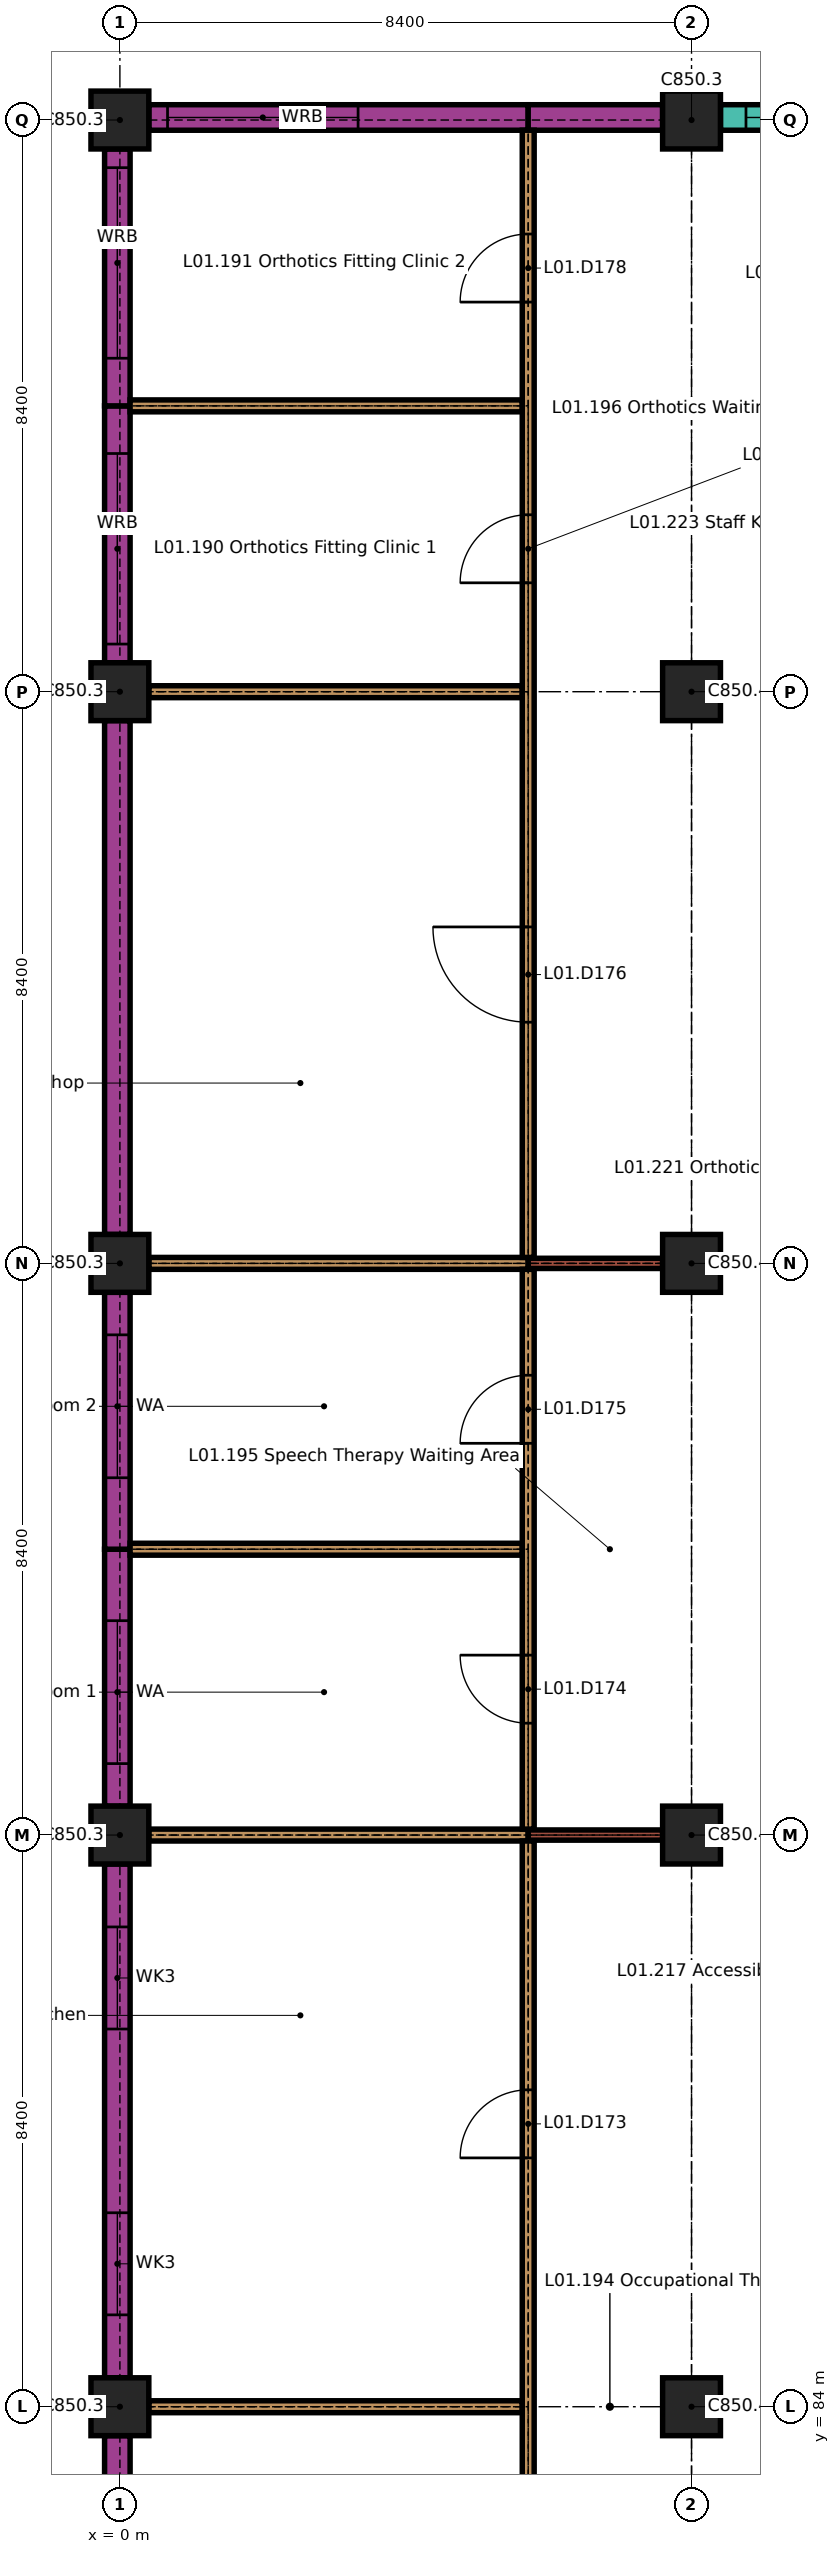
"""IFC4 building model, lengths in metres.
Left out: names, types, materials, properties, quantities, classifications, styles, units other than length and angle.
Written with IfcOpenShell. Run it as: python <this file> out.ifc"""

import sys

from ifc_helpers import new_model, si_unit, direction, frame, frame_2d, origin, origin_2d, place, context, subcontext, project, spatial, rectangle, extrude, element, fill, save


model = new_model("IFC4")
c1 = context("Model", 3, precision=1e-05, world=origin(), true_north=direction((0.0, 1.0)))
c2 = subcontext(c1, "Body", "Model", "MODEL_VIEW")
j1 = project(units=[si_unit("LENGTHUNIT", "METRE"), si_unit("PLANEANGLEUNIT", "RADIAN")], contexts=[c1])
p1 = place(None, origin())
s1 = spatial("IfcSite", under=j1, at=p1, CompositionType="ELEMENT")
p2 = place(p1, origin())
s2 = spatial("IfcBuilding", under=s1, at=p2, CompositionType="ELEMENT")
p3 = place(p2, frame((0.0, 0.0, 4.5)))
s3 = spatial("IfcBuildingStorey", under=s2, at=p3, CompositionType="ELEMENT", Elevation=4.5)
for number, where, z_axis, x_axis in (
    (1, (0.0, 84.0, 0.0), (0.0, 0.0, 1.0), (1.0, 0.0, 0.0)),
    (2, (8.4, 84.0, 0.0), (0.0, 0.0, 1.0), (1.0, 0.0, 0.0)),
    (3, (0.0, 92.4, 0.0), (0.0, 0.0, 1.0), (1.0, 0.0, 0.0)),
    (4, (8.4, 92.4, 0.0), (0.0, 0.0, 1.0), (1.0, 0.0, 0.0)),
    (5, (0.0, 100.8, 0.0), (0.0, 0.0, 1.0), (1.0, 0.0, 0.0)),
    (6, (8.4, 100.8, 0.0), (0.0, 0.0, 1.0), (1.0, 0.0, 0.0)),
    (7, (0.0, 109.2, 0.0), (0.0, 0.0, 1.0), (1.0, 0.0, 0.0)),
    (8, (8.4, 109.2, 0.0), (0.0, 0.0, 1.0), (1.0, 0.0, 0.0)),
    (9, (0.0, 117.6, 0.0), (0.0, 0.0, 1.0), (1.0, 0.0, 0.0)),
    (10, (8.4, 117.6, 0.0), (0.0, 0.0, 1.0), (1.0, 0.0, 0.0)),
):
    element("IfcColumn", number, at=place(p3, frame(where, z_axis=z_axis, x_axis=x_axis)), inside=s3, PredefinedType="COLUMN", context=c2, shape_type="SweptSolid", body=[
        extrude(rectangle(XDim=0.85, YDim=0.85, at=origin_2d()), origin(), (0.0, 0.0, 1.0), 3.45),
    ])
p4 = place(p3, frame((0.425, 117.637, 0.0), z_axis=(0.0, 0.0, 1.0), x_axis=(1.0, 0.0, 0.0)))
e11 = element("IfcWall", 11, at=p4, inside=s3, PredefinedType="SOLIDWALL", context=c2, shape_type="SweptSolid", body=[
    extrude(rectangle(XDim=5.575, YDim=0.375, at=frame_2d((2.788, 0.0))), origin(), (0.0, 0.0, 1.0), 3.15),
])
p5 = place(p4, frame((0.275, 0.0, 1.0)))
e12 = element("IfcOpeningElement", 12, at=p5, cuts=e11, PredefinedType="OPENING", context=c2, shape_type="SweptSolid", body=[
    extrude(rectangle(XDim=2.8, YDim=1.2, at=frame_2d((1.4, 0.6))), frame((0.0, 0.198, 0.0), z_axis=(0.0, -1.0, 0.0), x_axis=(1.0, 0.0, 0.0)), (0.0, 0.0, 1.0), 0.395),
])
p6 = place(p3, frame((6.0, 117.637, 0.0), z_axis=(0.0, 0.0, 1.0), x_axis=(1.0, 0.0, 0.0)))
e13 = element("IfcWall", 13, at=p6, inside=s3, PredefinedType="SOLIDWALL", context=c2, shape_type="SweptSolid", body=[
    extrude(rectangle(XDim=1.975, YDim=0.375, at=frame_2d((0.988, 0.0))), origin(), (0.0, 0.0, 1.0), 3.15),
])
p7 = place(p3, frame((8.825, 117.637, 0.0), z_axis=(0.0, 0.0, 1.0), x_axis=(1.0, 0.0, 0.0)))
e14 = element("IfcWall", 14, at=p7, inside=s3, PredefinedType="SOLIDWALL", context=c2, shape_type="SweptSolid", body=[
    extrude(rectangle(XDim=2.175, YDim=0.375, at=frame_2d((1.087, 0.0))), origin(), (0.0, 0.0, 1.0), 3.45),
])
p8 = place(p7, frame((0.375, 0.0, 0.9)))
e15 = element("IfcOpeningElement", 15, at=p8, cuts=e14, PredefinedType="OPENING", context=c2, shape_type="SweptSolid", body=[
    extrude(rectangle(XDim=1.2, YDim=1.5, at=frame_2d((0.6, 0.75))), frame((0.0, 0.198, 0.0), z_axis=(0.0, -1.0, 0.0), x_axis=(1.0, 0.0, 0.0)), (0.0, 0.0, 1.0), 0.395),
])
p9 = place(p3, frame((-0.038, 75.6, 0.0), z_axis=(0.0, 0.0, 1.0), x_axis=(0.0, 1.0, 0.0)))
e16 = element("IfcWall", 16, at=p9, inside=s3, PredefinedType="SOLIDWALL", context=c2, shape_type="SweptSolid", body=[
    extrude(rectangle(XDim=7.975, YDim=0.375, at=frame_2d((3.987, 0.0))), origin(), (0.0, 0.0, 1.0), 3.15),
])
p10 = place(p3, frame((-0.038, 84.425, 0.0), z_axis=(0.0, 0.0, 1.0), x_axis=(0.0, 1.0, 0.0)))
e17 = element("IfcWall", 17, at=p10, inside=s3, PredefinedType="SOLIDWALL", context=c2, shape_type="SweptSolid", body=[
    extrude(rectangle(XDim=7.55, YDim=0.375, at=frame_2d((3.775, 0.0))), origin(), (0.0, 0.0, 1.0), 3.15),
])
p11 = place(p10, frame((0.925, 0.0, 1.2)))
e18 = element("IfcOpeningElement", 18, at=p11, cuts=e17, PredefinedType="OPENING", context=c2, shape_type="SweptSolid", body=[
    extrude(rectangle(XDim=1.5, YDim=0.9, at=frame_2d((0.75, 0.45))), frame((0.0, 0.198, 0.0), z_axis=(0.0, -1.0, 0.0), x_axis=(1.0, 0.0, 0.0)), (0.0, 0.0, 1.0), 0.395),
])
p12 = place(p10, frame((5.125, 0.0, 1.2)))
e19 = element("IfcOpeningElement", 19, at=p12, cuts=e17, PredefinedType="OPENING", context=c2, shape_type="SweptSolid", body=[
    extrude(rectangle(XDim=1.5, YDim=0.9, at=frame_2d((0.75, 0.45))), frame((0.0, 0.198, 0.0), z_axis=(0.0, -1.0, 0.0), x_axis=(1.0, 0.0, 0.0)), (0.0, 0.0, 1.0), 0.395),
])
p13 = place(p3, frame((-0.038, 92.825, 0.0), z_axis=(0.0, 0.0, 1.0), x_axis=(0.0, 1.0, 0.0)))
e20 = element("IfcWall", 20, at=p13, inside=s3, PredefinedType="SOLIDWALL", context=c2, shape_type="SweptSolid", body=[
    extrude(rectangle(XDim=3.775, YDim=0.375, at=frame_2d((1.888, 0.0))), origin(), (0.0, 0.0, 1.0), 3.15),
])
p14 = place(p13, frame((0.625, 0.0, 0.9)))
e21 = element("IfcOpeningElement", 21, at=p14, cuts=e20, PredefinedType="OPENING", context=c2, shape_type="SweptSolid", body=[
    extrude(rectangle(XDim=2.1, YDim=1.5, at=frame_2d((1.05, 0.75))), frame((0.0, 0.198, 0.0), z_axis=(0.0, -1.0, 0.0), x_axis=(1.0, 0.0, 0.0)), (0.0, 0.0, 1.0), 0.395),
])
p15 = place(p3, frame((-0.038, 96.6, 0.0), z_axis=(0.0, 0.0, 1.0), x_axis=(0.0, 1.0, 0.0)))
e22 = element("IfcWall", 22, at=p15, inside=s3, PredefinedType="SOLIDWALL", context=c2, shape_type="SweptSolid", body=[
    extrude(rectangle(XDim=3.775, YDim=0.375, at=frame_2d((1.887, 0.0))), origin(), (0.0, 0.0, 1.0), 3.15),
])
p16 = place(p15, frame((1.05, 0.0, 0.9)))
e23 = element("IfcOpeningElement", 23, at=p16, cuts=e22, PredefinedType="OPENING", context=c2, shape_type="SweptSolid", body=[
    extrude(rectangle(XDim=2.1, YDim=1.5, at=frame_2d((1.05, 0.75))), frame((0.0, 0.198, 0.0), z_axis=(0.0, -1.0, 0.0), x_axis=(1.0, 0.0, 0.0)), (0.0, 0.0, 1.0), 0.395),
])
p17 = place(p3, frame((-0.038, 101.225, 0.0), z_axis=(0.0, 0.0, 1.0), x_axis=(0.0, 1.0, 0.0)))
e24 = element("IfcWall", 24, at=p17, inside=s3, PredefinedType="SOLIDWALL", context=c2, shape_type="SweptSolid", body=[
    extrude(rectangle(XDim=7.55, YDim=0.375, at=frame_2d((3.775, 0.0))), origin(), (0.0, 0.0, 1.0), 3.15),
])
p18 = place(p3, frame((-0.038, 109.625, 0.0), z_axis=(0.0, 0.0, 1.0), x_axis=(0.0, 1.0, 0.0)))
e25 = element("IfcWall", 25, at=p18, inside=s3, PredefinedType="SOLIDWALL", context=c2, shape_type="SweptSolid", body=[
    extrude(rectangle(XDim=3.775, YDim=0.375, at=frame_2d((1.887, 0.0))), origin(), (0.0, 0.0, 1.0), 3.15),
])
p19 = place(p18, frame((0.275, 0.0, 1.0)))
e26 = element("IfcOpeningElement", 26, at=p19, cuts=e25, PredefinedType="OPENING", context=c2, shape_type="SweptSolid", body=[
    extrude(rectangle(XDim=2.8, YDim=1.2, at=frame_2d((1.4, 0.6))), frame((0.0, 0.198, 0.0), z_axis=(0.0, -1.0, 0.0), x_axis=(1.0, 0.0, 0.0)), (0.0, 0.0, 1.0), 0.395),
])
p20 = place(p3, frame((-0.038, 113.4, 0.0), z_axis=(0.0, 0.0, 1.0), x_axis=(0.0, 1.0, 0.0)))
e27 = element("IfcWall", 27, at=p20, inside=s3, PredefinedType="SOLIDWALL", context=c2, shape_type="SweptSolid", body=[
    extrude(rectangle(XDim=3.775, YDim=0.375, at=frame_2d((1.888, 0.0))), origin(), (0.0, 0.0, 1.0), 3.15),
])
p21 = place(p20, frame((0.7, 0.0, 1.0)))
e28 = element("IfcOpeningElement", 28, at=p21, cuts=e27, PredefinedType="OPENING", context=c2, shape_type="SweptSolid", body=[
    extrude(rectangle(XDim=2.8, YDim=1.2, at=frame_2d((1.4, 0.6))), frame((0.0, 0.198, 0.0), z_axis=(0.0, -1.0, 0.0), x_axis=(1.0, 0.0, 0.0)), (0.0, 0.0, 1.0), 0.395),
])
p22 = place(p3, frame((0.425, 84.0, 0.0), z_axis=(0.0, 0.0, 1.0), x_axis=(1.0, 0.0, 0.0)))
e29 = element("IfcWall", 29, at=p22, inside=s3, PredefinedType="PARTITIONING", context=c2, shape_type="SweptSolid", body=[
    extrude(rectangle(XDim=5.488, YDim=0.175, at=frame_2d((2.744, 0.0))), origin(), (0.0, 0.0, 1.0), 3.45),
])
p23 = place(p3, frame((0.425, 92.4, 0.0), z_axis=(0.0, 0.0, 1.0), x_axis=(1.0, 0.0, 0.0)))
e30 = element("IfcWall", 30, at=p23, inside=s3, PredefinedType="PARTITIONING", context=c2, shape_type="SweptSolid", body=[
    extrude(rectangle(XDim=5.575, YDim=0.175, at=frame_2d((2.788, 0.0))), origin(), (0.0, 0.0, 1.0), 3.45),
])
p24 = place(p3, frame((6.0, 92.4, 0.0), z_axis=(0.0, 0.0, 1.0), x_axis=(1.0, 0.0, 0.0)))
e31 = element("IfcWall", 31, at=p24, inside=s3, PredefinedType="PARTITIONING", context=c2, shape_type="SweptSolid", body=[
    extrude(rectangle(XDim=1.975, YDim=0.15, at=frame_2d((0.988, 0.0))), origin(), (0.0, 0.0, 1.0), 3.45),
])
p25 = place(p3, frame((0.15, 96.6, 0.0), z_axis=(0.0, 0.0, 1.0), x_axis=(1.0, 0.0, 0.0)))
e32 = element("IfcWall", 32, at=p25, inside=s3, PredefinedType="PARTITIONING", context=c2, shape_type="SweptSolid", body=[
    extrude(rectangle(XDim=5.763, YDim=0.175, at=frame_2d((2.881, 0.0))), origin(), (0.0, 0.0, 1.0), 3.45),
])
p26 = place(p3, frame((0.425, 100.8, 0.0), z_axis=(0.0, 0.0, 1.0), x_axis=(1.0, 0.0, 0.0)))
e33 = element("IfcWall", 33, at=p26, inside=s3, PredefinedType="PARTITIONING", context=c2, shape_type="SweptSolid", body=[
    extrude(rectangle(XDim=5.575, YDim=0.175, at=frame_2d((2.788, 0.0))), origin(), (0.0, 0.0, 1.0), 3.45),
])
p27 = place(p3, frame((6.0, 100.8, 0.0), z_axis=(0.0, 0.0, 1.0), x_axis=(1.0, 0.0, 0.0)))
e34 = element("IfcWall", 34, at=p27, inside=s3, PredefinedType="PARTITIONING", context=c2, shape_type="SweptSolid", body=[
    extrude(rectangle(XDim=1.975, YDim=0.15, at=frame_2d((0.988, 0.0))), origin(), (0.0, 0.0, 1.0), 3.45),
])
p28 = place(p3, frame((0.425, 109.2, 0.0), z_axis=(0.0, 0.0, 1.0), x_axis=(1.0, 0.0, 0.0)))
e35 = element("IfcWall", 35, at=p28, inside=s3, PredefinedType="PARTITIONING", context=c2, shape_type="SweptSolid", body=[
    extrude(rectangle(XDim=5.488, YDim=0.175, at=frame_2d((2.744, 0.0))), origin(), (0.0, 0.0, 1.0), 3.45),
])
p29 = place(p3, frame((0.15, 113.4, 0.0), z_axis=(0.0, 0.0, 1.0), x_axis=(1.0, 0.0, 0.0)))
e36 = element("IfcWall", 36, at=p29, inside=s3, PredefinedType="PARTITIONING", context=c2, shape_type="SweptSolid", body=[
    extrude(rectangle(XDim=5.763, YDim=0.175, at=frame_2d((2.881, 0.0))), origin(), (0.0, 0.0, 1.0), 3.45),
])
p30 = place(p3, frame((6.0, 75.7, 0.0), z_axis=(0.0, 0.0, 1.0), x_axis=(0.0, 1.0, 0.0)))
e37 = element("IfcWall", 37, at=p30, inside=s3, PredefinedType="PARTITIONING", context=c2, shape_type="SweptSolid", body=[
    extrude(rectangle(XDim=16.613, YDim=0.175, at=frame_2d((8.306, 0.0))), origin(), (0.0, 0.0, 1.0), 3.45),
])
p31 = place(p30, frame((3.45, 0.0, 0.0)))
e38 = element("IfcOpeningElement", 38, at=p31, cuts=e37, PredefinedType="OPENING", context=c2, shape_type="SweptSolid", body=[
    extrude(rectangle(XDim=1.4, YDim=2.1, at=frame_2d((0.7, 1.05))), frame((0.0, 0.097, 0.0), z_axis=(0.0, -1.0, 0.0), x_axis=(1.0, 0.0, 0.0)), (0.0, 0.0, 1.0), 0.195),
])
p32 = place(p30, frame((11.956, 0.0, 0.0)))
e39 = element("IfcOpeningElement", 39, at=p32, cuts=e37, PredefinedType="OPENING", context=c2, shape_type="SweptSolid", body=[
    extrude(rectangle(XDim=1.0, YDim=2.1, at=frame_2d((0.5, 1.05))), frame((0.0, 0.097, 0.0), z_axis=(0.0, -1.0, 0.0), x_axis=(1.0, 0.0, 0.0)), (0.0, 0.0, 1.0), 0.195),
])
p33 = place(p3, frame((6.0, 92.488, 0.0), z_axis=(0.0, 0.0, 1.0), x_axis=(0.0, 1.0, 0.0)))
e40 = element("IfcWall", 40, at=p33, inside=s3, PredefinedType="PARTITIONING", context=c2, shape_type="SweptSolid", body=[
    extrude(rectangle(XDim=8.225, YDim=0.175, at=frame_2d((4.112, 0.0))), origin(), (0.0, 0.0, 1.0), 3.45),
])
p34 = place(p33, frame((1.556, 0.0, 0.0)))
e41 = element("IfcOpeningElement", 41, at=p34, cuts=e40, PredefinedType="OPENING", context=c2, shape_type="SweptSolid", body=[
    extrude(rectangle(XDim=1.0, YDim=2.1, at=frame_2d((0.5, 1.05))), frame((0.0, 0.097, 0.0), z_axis=(0.0, -1.0, 0.0), x_axis=(1.0, 0.0, 0.0)), (0.0, 0.0, 1.0), 0.195),
])
p35 = place(p33, frame((5.669, 0.0, 0.0)))
e42 = element("IfcOpeningElement", 42, at=p35, cuts=e40, PredefinedType="OPENING", context=c2, shape_type="SweptSolid", body=[
    extrude(rectangle(XDim=1.0, YDim=2.1, at=frame_2d((0.5, 1.05))), frame((0.0, 0.097, 0.0), z_axis=(0.0, -1.0, 0.0), x_axis=(1.0, 0.0, 0.0)), (0.0, 0.0, 1.0), 0.195),
])
p36 = place(p3, frame((6.0, 100.887, 0.0), z_axis=(0.0, 0.0, 1.0), x_axis=(0.0, 1.0, 0.0)))
e43 = element("IfcWall", 43, at=p36, inside=s3, PredefinedType="PARTITIONING", context=c2, shape_type="SweptSolid", body=[
    extrude(rectangle(XDim=16.562, YDim=0.175, at=frame_2d((8.281, 0.0))), origin(), (0.0, 0.0, 1.0), 3.45),
])
p37 = place(p36, frame((3.456, 0.0, 0.0)))
e44 = element("IfcOpeningElement", 44, at=p37, cuts=e43, PredefinedType="OPENING", context=c2, shape_type="SweptSolid", body=[
    extrude(rectangle(XDim=1.4, YDim=2.1, at=frame_2d((0.7, 1.05))), frame((0.0, 0.097, 0.0), z_axis=(0.0, -1.0, 0.0), x_axis=(1.0, 0.0, 0.0)), (0.0, 0.0, 1.0), 0.195),
])
p38 = place(p36, frame((9.913, 0.0, 0.0)))
e45 = element("IfcOpeningElement", 45, at=p38, cuts=e43, PredefinedType="OPENING", context=c2, shape_type="SweptSolid", body=[
    extrude(rectangle(XDim=1.0, YDim=2.1, at=frame_2d((0.5, 1.05))), frame((0.0, 0.097, 0.0), z_axis=(0.0, -1.0, 0.0), x_axis=(1.0, 0.0, 0.0)), (0.0, 0.0, 1.0), 0.195),
])
p39 = place(p36, frame((14.038, 0.0, 0.0)))
e46 = element("IfcOpeningElement", 46, at=p39, cuts=e43, PredefinedType="OPENING", context=c2, shape_type="SweptSolid", body=[
    extrude(rectangle(XDim=1.0, YDim=2.1, at=frame_2d((0.5, 1.05))), frame((0.0, 0.097, 0.0), z_axis=(0.0, -1.0, 0.0), x_axis=(1.0, 0.0, 0.0)), (0.0, 0.0, 1.0), 0.195),
])
p40 = place(p5, origin())
e47 = element("IfcWindow", 47, at=p40, inside=s3, PartitioningType="DOUBLE_PANEL_VERTICAL", PredefinedType="WINDOW", context=c2, shape_type="SweptSolid", body=[
    extrude(rectangle(XDim=2.8, YDim=1.2, at=frame_2d((1.4, 0.6))), frame((0.0, 0.03, 0.0), z_axis=(0.0, -1.0, 0.0), x_axis=(1.0, 0.0, 0.0)), (0.0, 0.0, 1.0), 0.06),
])
fill(e12, e47)
p41 = place(p8, origin())
e48 = element("IfcWindow", 48, at=p41, inside=s3, PartitioningType="SINGLE_PANEL", PredefinedType="WINDOW", context=c2, shape_type="SweptSolid", body=[
    extrude(rectangle(XDim=1.2, YDim=1.5, at=frame_2d((0.6, 0.75))), frame((0.0, 0.03, 0.0), z_axis=(0.0, -1.0, 0.0), x_axis=(1.0, 0.0, 0.0)), (0.0, 0.0, 1.0), 0.06),
])
fill(e15, e48)
p42 = place(p11, origin())
e49 = element("IfcWindow", 49, at=p42, inside=s3, PartitioningType="DOUBLE_PANEL_VERTICAL", PredefinedType="WINDOW", context=c2, shape_type="SweptSolid", body=[
    extrude(rectangle(XDim=1.5, YDim=0.9, at=frame_2d((0.75, 0.45))), frame((0.0, 0.03, 0.0), z_axis=(0.0, -1.0, 0.0), x_axis=(1.0, 0.0, 0.0)), (0.0, 0.0, 1.0), 0.06),
])
fill(e18, e49)
p43 = place(p12, origin())
e50 = element("IfcWindow", 50, at=p43, inside=s3, PartitioningType="DOUBLE_PANEL_VERTICAL", PredefinedType="WINDOW", context=c2, shape_type="SweptSolid", body=[
    extrude(rectangle(XDim=1.5, YDim=0.9, at=frame_2d((0.75, 0.45))), frame((0.0, 0.03, 0.0), z_axis=(0.0, -1.0, 0.0), x_axis=(1.0, 0.0, 0.0)), (0.0, 0.0, 1.0), 0.06),
])
fill(e19, e50)
p44 = place(p14, origin())
e51 = element("IfcWindow", 51, at=p44, inside=s3, PartitioningType="DOUBLE_PANEL_VERTICAL", PredefinedType="WINDOW", context=c2, shape_type="SweptSolid", body=[
    extrude(rectangle(XDim=2.1, YDim=1.5, at=frame_2d((1.05, 0.75))), frame((0.0, 0.03, 0.0), z_axis=(0.0, -1.0, 0.0), x_axis=(1.0, 0.0, 0.0)), (0.0, 0.0, 1.0), 0.06),
])
fill(e21, e51)
p45 = place(p16, origin())
e52 = element("IfcWindow", 52, at=p45, inside=s3, PartitioningType="DOUBLE_PANEL_VERTICAL", PredefinedType="WINDOW", context=c2, shape_type="SweptSolid", body=[
    extrude(rectangle(XDim=2.1, YDim=1.5, at=frame_2d((1.05, 0.75))), frame((0.0, 0.03, 0.0), z_axis=(0.0, -1.0, 0.0), x_axis=(1.0, 0.0, 0.0)), (0.0, 0.0, 1.0), 0.06),
])
fill(e23, e52)
p46 = place(p19, origin())
e53 = element("IfcWindow", 53, at=p46, inside=s3, PartitioningType="DOUBLE_PANEL_VERTICAL", PredefinedType="WINDOW", context=c2, shape_type="SweptSolid", body=[
    extrude(rectangle(XDim=2.8, YDim=1.2, at=frame_2d((1.4, 0.6))), frame((0.0, 0.03, 0.0), z_axis=(0.0, -1.0, 0.0), x_axis=(1.0, 0.0, 0.0)), (0.0, 0.0, 1.0), 0.06),
])
fill(e26, e53)
p47 = place(p21, origin())
e54 = element("IfcWindow", 54, at=p47, inside=s3, PartitioningType="DOUBLE_PANEL_VERTICAL", PredefinedType="WINDOW", context=c2, shape_type="SweptSolid", body=[
    extrude(rectangle(XDim=2.8, YDim=1.2, at=frame_2d((1.4, 0.6))), frame((0.0, 0.03, 0.0), z_axis=(0.0, -1.0, 0.0), x_axis=(1.0, 0.0, 0.0)), (0.0, 0.0, 1.0), 0.06),
])
fill(e28, e54)
p48 = place(p32, origin())
e55 = element("IfcDoor", 55, at=p48, inside=s3, OperationType="SINGLE_SWING_RIGHT", PredefinedType="DOOR", context=c2, shape_type="SweptSolid", body=[
    extrude(rectangle(XDim=1.0, YDim=2.1, at=frame_2d((0.5, 1.05))), frame((0.0, 0.035, 0.0), z_axis=(0.0, -1.0, 0.0), x_axis=(1.0, 0.0, 0.0)), (0.0, 0.0, 1.0), 0.07),
])
fill(e39, e55)
p49 = place(p34, origin())
e56 = element("IfcDoor", 56, at=p49, inside=s3, OperationType="SINGLE_SWING_LEFT", PredefinedType="DOOR", context=c2, shape_type="SweptSolid", body=[
    extrude(rectangle(XDim=1.0, YDim=2.1, at=frame_2d((0.5, 1.05))), frame((0.0, 0.035, 0.0), z_axis=(0.0, -1.0, 0.0), x_axis=(1.0, 0.0, 0.0)), (0.0, 0.0, 1.0), 0.07),
])
fill(e41, e56)
p50 = place(p35, origin())
e57 = element("IfcDoor", 57, at=p50, inside=s3, OperationType="SINGLE_SWING_RIGHT", PredefinedType="DOOR", context=c2, shape_type="SweptSolid", body=[
    extrude(rectangle(XDim=1.0, YDim=2.1, at=frame_2d((0.5, 1.05))), frame((0.0, 0.035, 0.0), z_axis=(0.0, -1.0, 0.0), x_axis=(1.0, 0.0, 0.0)), (0.0, 0.0, 1.0), 0.07),
])
fill(e42, e57)
p51 = place(p37, origin())
e58 = element("IfcDoor", 58, at=p51, inside=s3, OperationType="SINGLE_SWING_LEFT", PredefinedType="DOOR", context=c2, shape_type="SweptSolid", body=[
    extrude(rectangle(XDim=1.4, YDim=2.1, at=frame_2d((0.7, 1.05))), frame((0.0, 0.025, 0.0), z_axis=(0.0, -1.0, 0.0), x_axis=(1.0, 0.0, 0.0)), (0.0, 0.0, 1.0), 0.05),
])
fill(e44, e58)
p52 = place(p38, origin())
e59 = element("IfcDoor", 59, at=p52, inside=s3, OperationType="SINGLE_SWING_RIGHT", PredefinedType="DOOR", context=c2, shape_type="SweptSolid", body=[
    extrude(rectangle(XDim=1.0, YDim=2.1, at=frame_2d((0.5, 1.05))), frame((0.0, 0.035, 0.0), z_axis=(0.0, -1.0, 0.0), x_axis=(1.0, 0.0, 0.0)), (0.0, 0.0, 1.0), 0.07),
])
fill(e45, e59)
p53 = place(p39, origin())
e60 = element("IfcDoor", 60, at=p53, inside=s3, OperationType="SINGLE_SWING_RIGHT", PredefinedType="DOOR", context=c2, shape_type="SweptSolid", body=[
    extrude(rectangle(XDim=1.0, YDim=2.1, at=frame_2d((0.5, 1.05))), frame((0.0, 0.035, 0.0), z_axis=(0.0, -1.0, 0.0), x_axis=(1.0, 0.0, 0.0)), (0.0, 0.0, 1.0), 0.07),
])
fill(e46, e60)
save(model, sys.argv[1])
